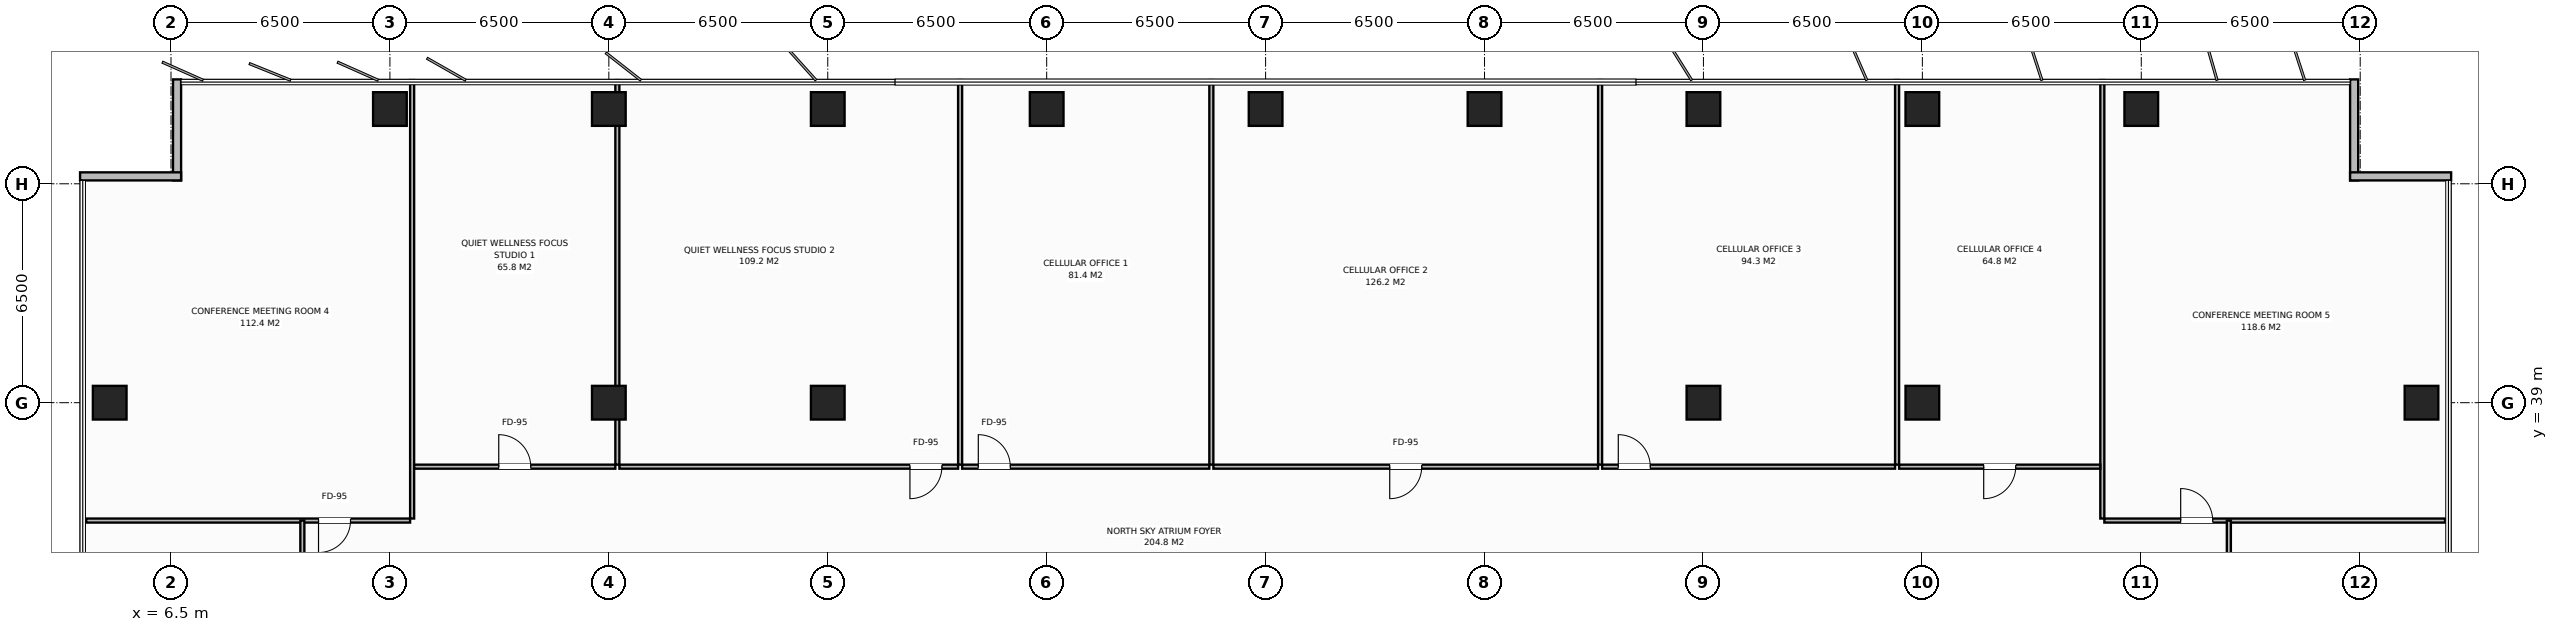
"""IFC4 building model, lengths in metres.
Left out: names, types, materials, properties, quantities, classifications, styles, units other than length and angle.
Written with IfcOpenShell. Run it as: python <this file> out.ifc"""

import sys

from ifc_helpers import new_model, si_unit, direction, frame, frame_2d, origin, origin_2d, place, context, subcontext, project, spatial, rectangle, extrude, element, fill, save


model = new_model("IFC4")
c1 = context("Model", 3, precision=1e-05, world=origin(), true_north=direction((0.0, 1.0)))
c2 = subcontext(c1, "Body", "Model", "MODEL_VIEW")
j1 = project(units=[si_unit("LENGTHUNIT", "METRE"), si_unit("PLANEANGLEUNIT", "RADIAN")], contexts=[c1])
p1 = place(None, origin())
s1 = spatial("IfcSite", under=j1, at=p1, CompositionType="ELEMENT")
p2 = place(p1, origin())
s2 = spatial("IfcBuilding", under=s1, at=p2, CompositionType="ELEMENT")
p3 = place(p2, frame((0.0, 0.0, 182.2)))
s3 = spatial("IfcBuildingStorey", under=s2, at=p3, CompositionType="ELEMENT", Elevation=182.2)
for number, where, z_axis, x_axis in (
    (1, (19.5, 39.0, 0.0), (0.0, 0.0, 1.0), (1.0, 0.0, 0.0)),
    (2, (58.5, 39.0, 0.0), (0.0, 0.0, 1.0), (1.0, 0.0, 0.0)),
    (3, (26.0, 39.0, 0.0), (0.0, 0.0, 1.0), (1.0, 0.0, 0.0)),
    (4, (52.0, 39.0, 0.0), (0.0, 0.0, 1.0), (1.0, 0.0, 0.0)),
    (5, (13.0, 47.72, 0.0), (0.0, 0.0, 1.0), (1.0, 0.0, 0.0)),
    (6, (19.5, 47.72, 0.0), (0.0, 0.0, 1.0), (1.0, 0.0, 0.0)),
    (7, (26.0, 47.72, 0.0), (0.0, 0.0, 1.0), (1.0, 0.0, 0.0)),
    (8, (32.5, 47.72, 0.0), (0.0, 0.0, 1.0), (1.0, 0.0, 0.0)),
    (9, (39.0, 47.72, 0.0), (0.0, 0.0, 1.0), (1.0, 0.0, 0.0)),
    (10, (45.5, 47.72, 0.0), (0.0, 0.0, 1.0), (1.0, 0.0, 0.0)),
    (11, (52.0, 47.72, 0.0), (0.0, 0.0, 1.0), (1.0, 0.0, 0.0)),
    (12, (58.5, 47.72, 0.0), (0.0, 0.0, 1.0), (1.0, 0.0, 0.0)),
    (13, (65.0, 47.72, 0.0), (0.0, 0.0, 1.0), (1.0, 0.0, 0.0)),
    (14, (4.68, 39.0, 0.0), (0.0, 0.0, 1.0), (1.0, 0.0, 0.0)),
    (15, (73.32, 39.0, 0.0), (0.0, 0.0, 1.0), (1.0, 0.0, 0.0)),
):
    element("IfcColumn", number, at=place(p3, frame(where, z_axis=z_axis, x_axis=x_axis)), inside=s3, PredefinedType="COLUMN", context=c2, shape_type="SweptSolid", body=[
        extrude(rectangle(XDim=1.0, YDim=1.0, at=origin_2d()), origin(), (0.0, 0.0, 1.0), 3.8),
    ])
for number, where, z_axis, x_axis in (
    (16, (6.68, 45.6, 0.0), (0.0, 0.0, 1.0), (0.0, 1.0, 0.0)),
    (17, (3.8, 45.72, 0.0), (0.0, 0.0, 1.0), (1.0, 0.0, 0.0)),
    (18, (71.32, 48.6, 0.0), (0.0, 0.0, 1.0), (0.0, -1.0, 0.0)),
    (19, (71.2, 45.72, 0.0), (0.0, 0.0, 1.0), (1.0, 0.0, 0.0)),
):
    element("IfcWall", number, at=place(p3, frame(where, z_axis=z_axis, x_axis=x_axis)), inside=s3, PredefinedType="STANDARD", context=c2, shape_type="SweptSolid", body=[
        extrude(rectangle(XDim=3.0, YDim=0.24, at=frame_2d((1.5, 0.0))), origin(), (0.0, 0.0, 1.0), 3.572),
    ])
p4 = place(p3, frame((13.659, 35.56, 0.0), z_axis=(0.0, 0.0, 1.0), x_axis=(0.0, 1.0, 0.0)))
e20 = element("IfcWall", 20, at=p4, inside=s3, PredefinedType="PARTITIONING", context=c2, shape_type="SweptSolid", body=[
    extrude(rectangle(XDim=13.02, YDim=0.12, at=frame_2d((6.51, 0.0))), origin(), (0.0, 0.0, 1.0), 3.572),
])
p5 = place(p3, frame((3.98, 35.5, 0.0), z_axis=(0.0, 0.0, 1.0), x_axis=(1.0, 0.0, 0.0)))
e21 = element("IfcWall", 21, at=p5, inside=s3, PredefinedType="PARTITIONING", context=c2, shape_type="SweptSolid", body=[
    extrude(rectangle(XDim=9.62, YDim=0.12, at=frame_2d((4.81, 0.0))), origin(), (0.0, 0.0, 1.0), 3.572),
])
p6 = place(p5, frame((6.9, 0.0, 0.0)))
e22 = element("IfcOpeningElement", 22, at=p6, cuts=e21, PredefinedType="OPENING", context=c2, shape_type="SweptSolid", body=[
    extrude(rectangle(XDim=0.95, YDim=2.15, at=frame_2d((0.475, 1.075))), frame((0.0, 0.07, 0.0), z_axis=(0.0, -1.0, 0.0), x_axis=(1.0, 0.0, 0.0)), (0.0, 0.0, 1.0), 0.14),
])
p7 = place(p3, frame((19.753, 37.16, 0.0), z_axis=(0.0, 0.0, 1.0), x_axis=(0.0, 1.0, 0.0)))
e23 = element("IfcWall", 23, at=p7, inside=s3, PredefinedType="PARTITIONING", context=c2, shape_type="SweptSolid", body=[
    extrude(rectangle(XDim=11.42, YDim=0.12, at=frame_2d((5.71, 0.0))), origin(), (0.0, 0.0, 1.0), 3.572),
])
p8 = place(p3, frame((13.719, 37.1, 0.0), z_axis=(0.0, 0.0, 1.0), x_axis=(1.0, 0.0, 0.0)))
e24 = element("IfcWall", 24, at=p8, inside=s3, PredefinedType="PARTITIONING", context=c2, shape_type="SweptSolid", body=[
    extrude(rectangle(XDim=5.974, YDim=0.12, at=frame_2d((2.987, 0.0))), origin(), (0.0, 0.0, 1.0), 3.572),
])
p9 = place(p8, frame((2.512, 0.0, 0.0)))
e25 = element("IfcOpeningElement", 25, at=p9, cuts=e24, PredefinedType="OPENING", context=c2, shape_type="SweptSolid", body=[
    extrude(rectangle(XDim=0.95, YDim=2.15, at=frame_2d((0.475, 1.075))), frame((0.0, 0.07, 0.0), z_axis=(0.0, -1.0, 0.0), x_axis=(1.0, 0.0, 0.0)), (0.0, 0.0, 1.0), 0.14),
])
p10 = place(p3, frame((29.93, 37.16, 0.0), z_axis=(0.0, 0.0, 1.0), x_axis=(0.0, 1.0, 0.0)))
e26 = element("IfcWall", 26, at=p10, inside=s3, PredefinedType="PARTITIONING", context=c2, shape_type="SweptSolid", body=[
    extrude(rectangle(XDim=11.42, YDim=0.12, at=frame_2d((5.71, 0.0))), origin(), (0.0, 0.0, 1.0), 3.572),
])
p11 = place(p3, frame((19.813, 37.1, 0.0), z_axis=(0.0, 0.0, 1.0), x_axis=(1.0, 0.0, 0.0)))
e27 = element("IfcWall", 27, at=p11, inside=s3, PredefinedType="PARTITIONING", context=c2, shape_type="SweptSolid", body=[
    extrude(rectangle(XDim=10.057, YDim=0.12, at=frame_2d((5.028, 0.0))), origin(), (0.0, 0.0, 1.0), 3.572),
])
p12 = place(p11, frame((8.627, 0.0, 0.0)))
e28 = element("IfcOpeningElement", 28, at=p12, cuts=e27, PredefinedType="OPENING", context=c2, shape_type="SweptSolid", body=[
    extrude(rectangle(XDim=0.95, YDim=2.15, at=frame_2d((0.475, 1.075))), frame((0.0, 0.07, 0.0), z_axis=(0.0, -1.0, 0.0), x_axis=(1.0, 0.0, 0.0)), (0.0, 0.0, 1.0), 0.14),
])
p13 = place(p3, frame((37.389, 37.16, 0.0), z_axis=(0.0, 0.0, 1.0), x_axis=(0.0, 1.0, 0.0)))
e29 = element("IfcWall", 29, at=p13, inside=s3, PredefinedType="PARTITIONING", context=c2, shape_type="SweptSolid", body=[
    extrude(rectangle(XDim=11.42, YDim=0.12, at=frame_2d((5.71, 0.0))), origin(), (0.0, 0.0, 1.0), 3.572),
])
p14 = place(p3, frame((29.99, 37.1, 0.0), z_axis=(0.0, 0.0, 1.0), x_axis=(1.0, 0.0, 0.0)))
e30 = element("IfcWall", 30, at=p14, inside=s3, PredefinedType="PARTITIONING", context=c2, shape_type="SweptSolid", body=[
    extrude(rectangle(XDim=7.339, YDim=0.12, at=frame_2d((3.67, 0.0))), origin(), (0.0, 0.0, 1.0), 3.572),
])
p15 = place(p14, frame((0.48, 0.0, 0.0)))
e31 = element("IfcOpeningElement", 31, at=p15, cuts=e30, PredefinedType="OPENING", context=c2, shape_type="SweptSolid", body=[
    extrude(rectangle(XDim=0.95, YDim=2.15, at=frame_2d((0.475, 1.075))), frame((0.0, 0.07, 0.0), z_axis=(0.0, -1.0, 0.0), x_axis=(1.0, 0.0, 0.0)), (0.0, 0.0, 1.0), 0.14),
])
p16 = place(p3, frame((48.932, 37.16, 0.0), z_axis=(0.0, 0.0, 1.0), x_axis=(0.0, 1.0, 0.0)))
e32 = element("IfcWall", 32, at=p16, inside=s3, PredefinedType="PARTITIONING", context=c2, shape_type="SweptSolid", body=[
    extrude(rectangle(XDim=11.42, YDim=0.12, at=frame_2d((5.71, 0.0))), origin(), (0.0, 0.0, 1.0), 3.572),
])
p17 = place(p3, frame((37.449, 37.1, 0.0), z_axis=(0.0, 0.0, 1.0), x_axis=(1.0, 0.0, 0.0)))
e33 = element("IfcWall", 33, at=p17, inside=s3, PredefinedType="PARTITIONING", context=c2, shape_type="SweptSolid", body=[
    extrude(rectangle(XDim=11.422, YDim=0.12, at=frame_2d((5.711, 0.0))), origin(), (0.0, 0.0, 1.0), 3.572),
])
p18 = place(p17, frame((5.236, 0.0, 0.0)))
e34 = element("IfcOpeningElement", 34, at=p18, cuts=e33, PredefinedType="OPENING", context=c2, shape_type="SweptSolid", body=[
    extrude(rectangle(XDim=0.95, YDim=2.15, at=frame_2d((0.475, 1.075))), frame((0.0, 0.07, 0.0), z_axis=(0.0, -1.0, 0.0), x_axis=(1.0, 0.0, 0.0)), (0.0, 0.0, 1.0), 0.14),
])
p19 = place(p3, frame((57.75, 37.16, 0.0), z_axis=(0.0, 0.0, 1.0), x_axis=(0.0, 1.0, 0.0)))
e35 = element("IfcWall", 35, at=p19, inside=s3, PredefinedType="PARTITIONING", context=c2, shape_type="SweptSolid", body=[
    extrude(rectangle(XDim=11.42, YDim=0.12, at=frame_2d((5.71, 0.0))), origin(), (0.0, 0.0, 1.0), 3.572),
])
p20 = place(p3, frame((48.992, 37.1, 0.0), z_axis=(0.0, 0.0, 1.0), x_axis=(1.0, 0.0, 0.0)))
e36 = element("IfcWall", 36, at=p20, inside=s3, PredefinedType="PARTITIONING", context=c2, shape_type="SweptSolid", body=[
    extrude(rectangle(XDim=8.698, YDim=0.12, at=frame_2d((4.349, 0.0))), origin(), (0.0, 0.0, 1.0), 3.572),
])
p21 = place(p20, frame((0.48, 0.0, 0.0)))
e37 = element("IfcOpeningElement", 37, at=p21, cuts=e36, PredefinedType="OPENING", context=c2, shape_type="SweptSolid", body=[
    extrude(rectangle(XDim=0.95, YDim=2.15, at=frame_2d((0.475, 1.075))), frame((0.0, 0.07, 0.0), z_axis=(0.0, -1.0, 0.0), x_axis=(1.0, 0.0, 0.0)), (0.0, 0.0, 1.0), 0.14),
])
p22 = place(p3, frame((63.843, 35.56, 0.0), z_axis=(0.0, 0.0, 1.0), x_axis=(0.0, 1.0, 0.0)))
e38 = element("IfcWall", 38, at=p22, inside=s3, PredefinedType="PARTITIONING", context=c2, shape_type="SweptSolid", body=[
    extrude(rectangle(XDim=13.02, YDim=0.12, at=frame_2d((6.51, 0.0))), origin(), (0.0, 0.0, 1.0), 3.572),
])
p23 = place(p3, frame((57.81, 37.1, 0.0), z_axis=(0.0, 0.0, 1.0), x_axis=(1.0, 0.0, 0.0)))
e39 = element("IfcWall", 39, at=p23, inside=s3, PredefinedType="PARTITIONING", context=c2, shape_type="SweptSolid", body=[
    extrude(rectangle(XDim=5.973, YDim=0.12, at=frame_2d((2.987, 0.0))), origin(), (0.0, 0.0, 1.0), 3.572),
])
p24 = place(p23, frame((2.512, 0.0, 0.0)))
e40 = element("IfcOpeningElement", 40, at=p24, cuts=e39, PredefinedType="OPENING", context=c2, shape_type="SweptSolid", body=[
    extrude(rectangle(XDim=0.95, YDim=2.15, at=frame_2d((0.475, 1.075))), frame((0.0, 0.07, 0.0), z_axis=(0.0, -1.0, 0.0), x_axis=(1.0, 0.0, 0.0)), (0.0, 0.0, 1.0), 0.14),
])
p25 = place(p3, frame((63.903, 35.5, 0.0), z_axis=(0.0, 0.0, 1.0), x_axis=(1.0, 0.0, 0.0)))
e41 = element("IfcWall", 41, at=p25, inside=s3, PredefinedType="PARTITIONING", context=c2, shape_type="SweptSolid", body=[
    extrude(rectangle(XDim=10.117, YDim=0.12, at=frame_2d((5.058, 0.0))), origin(), (0.0, 0.0, 1.0), 3.572),
])
p26 = place(p25, frame((2.267, 0.0, 0.0)))
e42 = element("IfcOpeningElement", 42, at=p26, cuts=e41, PredefinedType="OPENING", context=c2, shape_type="SweptSolid", body=[
    extrude(rectangle(XDim=0.95, YDim=2.15, at=frame_2d((0.475, 1.075))), frame((0.0, 0.07, 0.0), z_axis=(0.0, -1.0, 0.0), x_axis=(1.0, 0.0, 0.0)), (0.0, 0.0, 1.0), 0.14),
])
p27 = place(p3, frame((10.4, 27.05, 0.0), z_axis=(0.0, 0.0, 1.0), x_axis=(0.0, 1.0, 0.0)))
e43 = element("IfcWall", 43, at=p27, inside=s3, PredefinedType="PARTITIONING", context=c2, shape_type="SweptSolid", body=[
    extrude(rectangle(XDim=8.45, YDim=0.12, at=frame_2d((4.225, 0.0))), origin(), (0.0, 0.0, 1.0), 3.572),
])
p28 = place(p27, frame((2.7, 0.0, 0.0)))
e44 = element("IfcOpeningElement", 44, at=p28, cuts=e43, PredefinedType="OPENING", context=c2, shape_type="SweptSolid", body=[
    extrude(rectangle(XDim=0.95, YDim=2.15, at=frame_2d((0.475, 1.075))), frame((0.0, 0.07, 0.0), z_axis=(0.0, -1.0, 0.0), x_axis=(1.0, 0.0, 0.0)), (0.0, 0.0, 1.0), 0.14),
])
p29 = place(p3, frame((67.6, 16.5, 0.0), z_axis=(0.0, 0.0, 1.0), x_axis=(0.0, 1.0, 0.0)))
e45 = element("IfcWall", 45, at=p29, inside=s3, PredefinedType="PARTITIONING", context=c2, shape_type="SweptSolid", body=[
    extrude(rectangle(XDim=19.0, YDim=0.12, at=frame_2d((9.5, 0.0))), origin(), (0.0, 0.0, 1.0), 3.572),
])
p30 = place(p29, frame((9.025, 0.0, 0.0)))
e46 = element("IfcOpeningElement", 46, at=p30, cuts=e45, PredefinedType="OPENING", context=c2, shape_type="SweptSolid", body=[
    extrude(rectangle(XDim=0.95, YDim=2.15, at=frame_2d((0.475, 1.075))), frame((0.0, 0.07, 0.0), z_axis=(0.0, -1.0, 0.0), x_axis=(1.0, 0.0, 0.0)), (0.0, 0.0, 1.0), 0.14),
])
p31 = place(p6, origin())
e47 = element("IfcDoor", 47, at=p31, inside=s3, OperationType="SINGLE_SWING_RIGHT", PredefinedType="DOOR", context=c2, shape_type="SweptSolid", body=[
    extrude(rectangle(XDim=0.95, YDim=2.15, at=frame_2d((0.475, 1.075))), frame((0.0, 0.025, 0.0), z_axis=(0.0, -1.0, 0.0), x_axis=(1.0, 0.0, 0.0)), (0.0, 0.0, 1.0), 0.05),
])
fill(e22, e47)
p32 = place(p9, origin())
e48 = element("IfcDoor", 48, at=p32, inside=s3, OperationType="SINGLE_SWING_LEFT", PredefinedType="DOOR", context=c2, shape_type="SweptSolid", body=[
    extrude(rectangle(XDim=0.95, YDim=2.15, at=frame_2d((0.475, 1.075))), frame((0.0, 0.025, 0.0), z_axis=(0.0, -1.0, 0.0), x_axis=(1.0, 0.0, 0.0)), (0.0, 0.0, 1.0), 0.05),
])
fill(e25, e48)
p33 = place(p12, origin())
e49 = element("IfcDoor", 49, at=p33, inside=s3, OperationType="SINGLE_SWING_RIGHT", PredefinedType="DOOR", context=c2, shape_type="SweptSolid", body=[
    extrude(rectangle(XDim=0.95, YDim=2.15, at=frame_2d((0.475, 1.075))), frame((0.0, 0.025, 0.0), z_axis=(0.0, -1.0, 0.0), x_axis=(1.0, 0.0, 0.0)), (0.0, 0.0, 1.0), 0.05),
])
fill(e28, e49)
p34 = place(p15, origin())
e50 = element("IfcDoor", 50, at=p34, inside=s3, OperationType="SINGLE_SWING_LEFT", PredefinedType="DOOR", context=c2, shape_type="SweptSolid", body=[
    extrude(rectangle(XDim=0.95, YDim=2.15, at=frame_2d((0.475, 1.075))), frame((0.0, 0.025, 0.0), z_axis=(0.0, -1.0, 0.0), x_axis=(1.0, 0.0, 0.0)), (0.0, 0.0, 1.0), 0.05),
])
fill(e31, e50)
p35 = place(p18, origin())
e51 = element("IfcDoor", 51, at=p35, inside=s3, OperationType="SINGLE_SWING_RIGHT", PredefinedType="DOOR", context=c2, shape_type="SweptSolid", body=[
    extrude(rectangle(XDim=0.95, YDim=2.15, at=frame_2d((0.475, 1.075))), frame((0.0, 0.025, 0.0), z_axis=(0.0, -1.0, 0.0), x_axis=(1.0, 0.0, 0.0)), (0.0, 0.0, 1.0), 0.05),
])
fill(e34, e51)
p36 = place(p21, origin())
e52 = element("IfcDoor", 52, at=p36, inside=s3, OperationType="SINGLE_SWING_LEFT", PredefinedType="DOOR", context=c2, shape_type="SweptSolid", body=[
    extrude(rectangle(XDim=0.95, YDim=2.15, at=frame_2d((0.475, 1.075))), frame((0.0, 0.025, 0.0), z_axis=(0.0, -1.0, 0.0), x_axis=(1.0, 0.0, 0.0)), (0.0, 0.0, 1.0), 0.05),
])
fill(e37, e52)
p37 = place(p24, origin())
e53 = element("IfcDoor", 53, at=p37, inside=s3, OperationType="SINGLE_SWING_RIGHT", PredefinedType="DOOR", context=c2, shape_type="SweptSolid", body=[
    extrude(rectangle(XDim=0.95, YDim=2.15, at=frame_2d((0.475, 1.075))), frame((0.0, 0.025, 0.0), z_axis=(0.0, -1.0, 0.0), x_axis=(1.0, 0.0, 0.0)), (0.0, 0.0, 1.0), 0.05),
])
fill(e40, e53)
p38 = place(p26, origin())
e54 = element("IfcDoor", 54, at=p38, inside=s3, OperationType="SINGLE_SWING_LEFT", PredefinedType="DOOR", context=c2, shape_type="SweptSolid", body=[
    extrude(rectangle(XDim=0.95, YDim=2.15, at=frame_2d((0.475, 1.075))), frame((0.0, 0.025, 0.0), z_axis=(0.0, -1.0, 0.0), x_axis=(1.0, 0.0, 0.0)), (0.0, 0.0, 1.0), 0.05),
])
fill(e42, e54)
save(model, sys.argv[1])
